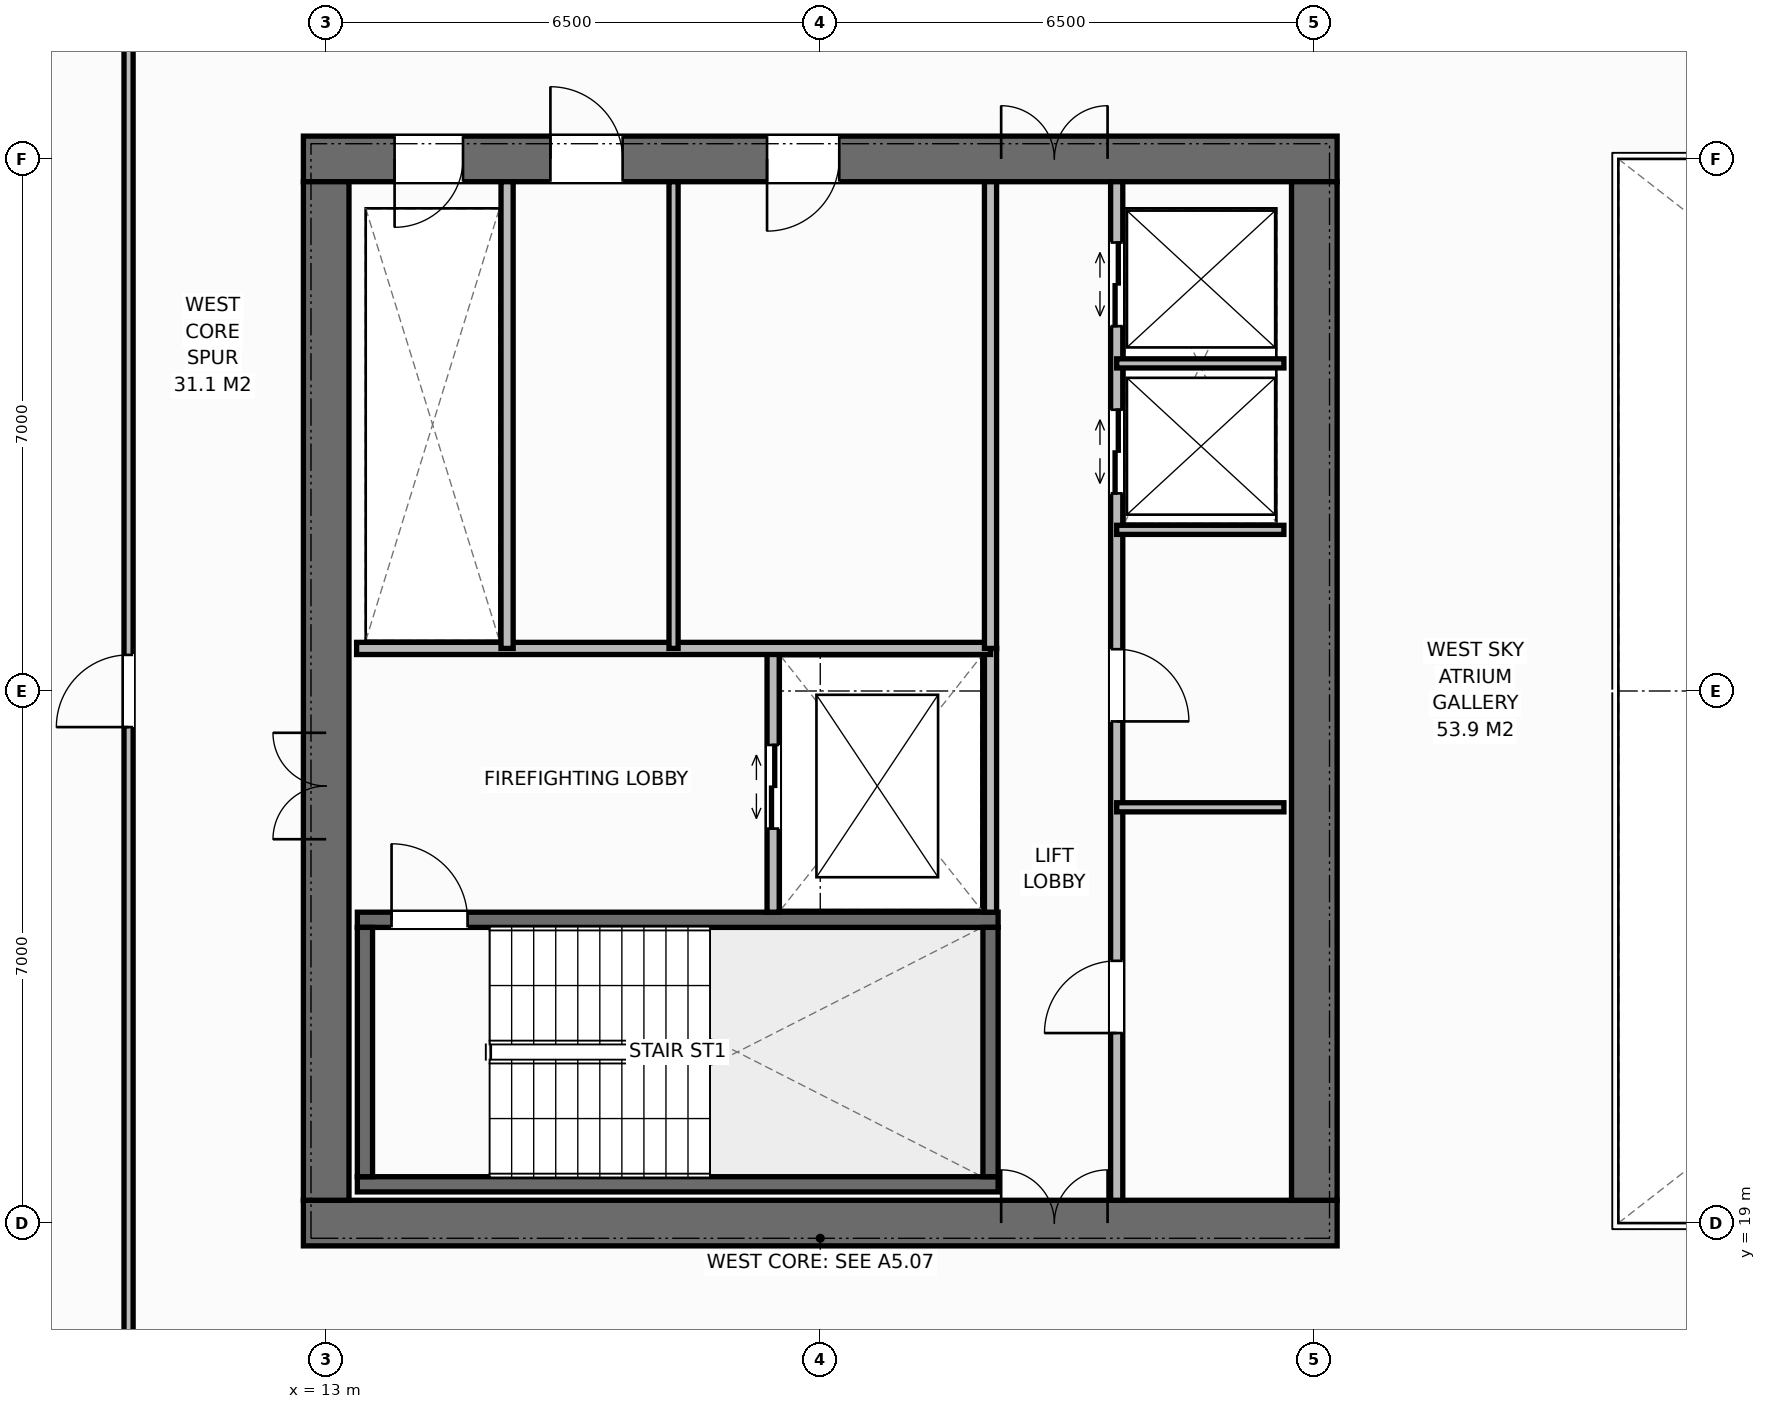
"""IFC4 building model, lengths in metres.
Left out: names, types, materials, properties, quantities, classifications, styles, units other than length and angle.
Written with IfcOpenShell. Run it as: python <this file> out.ifc"""

import sys

from ifc_helpers import new_model, si_unit, direction, frame, frame_2d, origin, place, context, subcontext, project, spatial, rectangle, extrude, element, fill, save


model = new_model("IFC4")
c1 = context("Model", 3, precision=1e-05, world=origin(), true_north=direction((0.0, 1.0)))
c2 = subcontext(c1, "Body", "Model", "MODEL_VIEW")
j1 = project(units=[si_unit("LENGTHUNIT", "METRE"), si_unit("PLANEANGLEUNIT", "RADIAN")], contexts=[c1])
p1 = place(None, origin())
s1 = spatial("IfcSite", under=j1, at=p1, CompositionType="ELEMENT")
p2 = place(p1, origin())
s2 = spatial("IfcBuilding", under=s1, at=p2, CompositionType="ELEMENT")
p3 = place(p2, frame((0.0, 0.0, 163.2)))
s3 = spatial("IfcBuildingStorey", under=s2, at=p3, CompositionType="ELEMENT", Elevation=163.2)
p4 = place(p3, frame((12.7, 19.0, 0.0), z_axis=(0.0, 0.0, 1.0), x_axis=(1.0, 0.0, 0.0)))
e1 = element("IfcWall", 1, at=p4, inside=s3, PredefinedType="SHEAR", context=c2, shape_type="SweptSolid", body=[
    extrude(rectangle(XDim=13.6, YDim=0.6, at=frame_2d((6.8, 0.0))), origin(), (0.0, 0.0, 1.0), 3.8),
])
p5 = place(p4, frame((9.18, 0.0, 0.0)))
e2 = element("IfcOpeningElement", 2, at=p5, cuts=e1, PredefinedType="OPENING", context=c2, shape_type="SweptSolid", body=[
    extrude(rectangle(XDim=1.4, YDim=2.2, at=frame_2d((0.7, 1.1))), frame((0.0, 0.31, 0.0), z_axis=(0.0, -1.0, 0.0), x_axis=(1.0, 0.0, 0.0)), (0.0, 0.0, 1.0), 0.62),
])
p6 = place(p3, frame((12.7, 33.0, 0.0), z_axis=(0.0, 0.0, 1.0), x_axis=(1.0, 0.0, 0.0)))
e3 = element("IfcWall", 3, at=p6, inside=s3, PredefinedType="SHEAR", context=c2, shape_type="SweptSolid", body=[
    extrude(rectangle(XDim=13.6, YDim=0.6, at=frame_2d((6.8, 0.0))), origin(), (0.0, 0.0, 1.0), 3.8),
])
p7 = place(p6, frame((1.2, 0.0, 0.0)))
e4 = element("IfcOpeningElement", 4, at=p7, cuts=e3, PredefinedType="OPENING", context=c2, shape_type="SweptSolid", body=[
    extrude(rectangle(XDim=0.9, YDim=2.15, at=frame_2d((0.45, 1.075))), frame((0.0, 0.31, 0.0), z_axis=(0.0, -1.0, 0.0), x_axis=(1.0, 0.0, 0.0)), (0.0, 0.0, 1.0), 0.62),
])
p8 = place(p6, frame((3.25, 0.0, 0.0)))
e5 = element("IfcOpeningElement", 5, at=p8, cuts=e3, PredefinedType="OPENING", context=c2, shape_type="SweptSolid", body=[
    extrude(rectangle(XDim=0.95, YDim=2.15, at=frame_2d((0.475, 1.075))), frame((0.0, 0.31, 0.0), z_axis=(0.0, -1.0, 0.0), x_axis=(1.0, 0.0, 0.0)), (0.0, 0.0, 1.0), 0.62),
])
p9 = place(p6, frame((6.1, 0.0, 0.0)))
e6 = element("IfcOpeningElement", 6, at=p9, cuts=e3, PredefinedType="OPENING", context=c2, shape_type="SweptSolid", body=[
    extrude(rectangle(XDim=0.95, YDim=2.15, at=frame_2d((0.475, 1.075))), frame((0.0, 0.31, 0.0), z_axis=(0.0, -1.0, 0.0), x_axis=(1.0, 0.0, 0.0)), (0.0, 0.0, 1.0), 0.62),
])
p10 = place(p6, frame((9.18, 0.0, 0.0)))
e7 = element("IfcOpeningElement", 7, at=p10, cuts=e3, PredefinedType="OPENING", context=c2, shape_type="SweptSolid", body=[
    extrude(rectangle(XDim=1.4, YDim=2.2, at=frame_2d((0.7, 1.1))), frame((0.0, 0.31, 0.0), z_axis=(0.0, -1.0, 0.0), x_axis=(1.0, 0.0, 0.0)), (0.0, 0.0, 1.0), 0.62),
])
p11 = place(p3, frame((13.0, 19.3, 0.0), z_axis=(0.0, 0.0, 1.0), x_axis=(0.0, 1.0, 0.0)))
e8 = element("IfcWall", 8, at=p11, inside=s3, PredefinedType="SHEAR", context=c2, shape_type="SweptSolid", body=[
    extrude(rectangle(XDim=13.4, YDim=0.6, at=frame_2d((6.7, 0.0))), origin(), (0.0, 0.0, 1.0), 3.8),
])
p12 = place(p11, frame((4.75, 0.0, 0.0)))
e9 = element("IfcOpeningElement", 9, at=p12, cuts=e8, PredefinedType="OPENING", context=c2, shape_type="SweptSolid", body=[
    extrude(rectangle(XDim=1.4, YDim=2.2, at=frame_2d((0.7, 1.1))), frame((0.0, 0.31, 0.0), z_axis=(0.0, -1.0, 0.0), x_axis=(1.0, 0.0, 0.0)), (0.0, 0.0, 1.0), 0.62),
])
p13 = place(p3, frame((26.0, 19.3, 0.0), z_axis=(0.0, 0.0, 1.0), x_axis=(0.0, 1.0, 0.0)))
e10 = element("IfcWall", 10, at=p13, inside=s3, PredefinedType="SHEAR", context=c2, shape_type="SweptSolid", body=[
    extrude(rectangle(XDim=13.4, YDim=0.6, at=frame_2d((6.7, 0.0))), origin(), (0.0, 0.0, 1.0), 3.8),
])
p14 = place(p3, frame((13.41, 19.51, 0.0), z_axis=(0.0, 0.0, 1.0), x_axis=(1.0, 0.0, 0.0)))
e11 = element("IfcWall", 11, at=p14, inside=s3, PredefinedType="SHEAR", context=c2, shape_type="SweptSolid", body=[
    extrude(rectangle(XDim=8.43, YDim=0.2, at=frame_2d((4.215, 0.0))), origin(), (0.0, 0.0, 1.0), 3.8),
])
p15 = place(p3, frame((13.41, 22.99, 0.0), z_axis=(0.0, 0.0, 1.0), x_axis=(1.0, 0.0, 0.0)))
e12 = element("IfcWall", 12, at=p15, inside=s3, PredefinedType="SHEAR", context=c2, shape_type="SweptSolid", body=[
    extrude(rectangle(XDim=8.43, YDim=0.2, at=frame_2d((4.215, 0.0))), origin(), (0.0, 0.0, 1.0), 3.8),
])
p16 = place(p15, frame((0.45, 0.0, 0.0)))
e13 = element("IfcOpeningElement", 13, at=p16, cuts=e12, PredefinedType="OPENING", context=c2, shape_type="SweptSolid", body=[
    extrude(rectangle(XDim=1.0, YDim=2.15, at=frame_2d((0.5, 1.075))), frame((0.0, 0.11, 0.0), z_axis=(0.0, -1.0, 0.0), x_axis=(1.0, 0.0, 0.0)), (0.0, 0.0, 1.0), 0.22),
])
for number, where, z_axis, x_axis in (
    (14, (13.51, 19.61, 0.0), (0.0, 0.0, 1.0), (0.0, 1.0, 0.0)),
    (15, (21.74, 19.61, 0.0), (0.0, 0.0, 1.0), (0.0, 1.0, 0.0)),
):
    element("IfcWall", number, at=place(p3, frame(where, z_axis=z_axis, x_axis=x_axis)), inside=s3, PredefinedType="SHEAR", context=c2, shape_type="SweptSolid", body=[
        extrude(rectangle(XDim=3.28, YDim=0.2, at=frame_2d((1.64, 0.0))), origin(), (0.0, 0.0, 1.0), 3.8),
    ])
p17 = place(p3, frame((21.74, 23.09, 0.0), z_axis=(0.0, 0.0, 1.0), x_axis=(0.0, 1.0, 0.0)))
e16 = element("IfcWall", 16, at=p17, inside=s3, PredefinedType="STANDARD", context=c2, shape_type="SweptSolid", body=[
    extrude(rectangle(XDim=3.47, YDim=0.16, at=frame_2d((1.735, 0.0))), origin(), (0.0, 0.0, 1.0), 3.572),
])
p18 = place(p3, frame((18.88, 23.09, 0.0), z_axis=(0.0, 0.0, 1.0), x_axis=(0.0, 1.0, 0.0)))
e17 = element("IfcWall", 17, at=p18, inside=s3, PredefinedType="STANDARD", context=c2, shape_type="SweptSolid", body=[
    extrude(rectangle(XDim=3.47, YDim=0.16, at=frame_2d((1.735, 0.0))), origin(), (0.0, 0.0, 1.0), 3.572),
])
p19 = place(p18, frame((1.1, 0.0, 0.0)))
e18 = element("IfcOpeningElement", 18, at=p19, cuts=e17, PredefinedType="OPENING", context=c2, shape_type="SweptSolid", body=[
    extrude(rectangle(XDim=1.1, YDim=2.2, at=frame_2d((0.55, 1.1))), frame((0.0, 0.09, 0.0), z_axis=(0.0, -1.0, 0.0), x_axis=(1.0, 0.0, 0.0)), (0.0, 0.0, 1.0), 0.18),
])
p20 = place(p3, frame((13.4, 26.56, 0.0), z_axis=(0.0, 0.0, 1.0), x_axis=(1.0, 0.0, 0.0)))
e19 = element("IfcWall", 19, at=p20, inside=s3, PredefinedType="STANDARD", context=c2, shape_type="SweptSolid", body=[
    extrude(rectangle(XDim=8.34, YDim=0.16, at=frame_2d((4.17, 0.0))), origin(), (0.0, 0.0, 1.0), 3.572),
])
p21 = place(p3, frame((15.38, 26.56, 0.0), z_axis=(0.0, 0.0, 1.0), x_axis=(0.0, 1.0, 0.0)))
e20 = element("IfcWall", 20, at=p21, inside=s3, PredefinedType="STANDARD", context=c2, shape_type="SweptSolid", body=[
    extrude(rectangle(XDim=6.14, YDim=0.16, at=frame_2d((3.07, 0.0))), origin(), (0.0, 0.0, 1.0), 3.572),
])
p22 = place(p3, frame((17.57, 26.56, 0.0), z_axis=(0.0, 0.0, 1.0), x_axis=(0.0, 1.0, 0.0)))
e21 = element("IfcWall", 21, at=p22, inside=s3, PredefinedType="PARTITIONING", context=c2, shape_type="SweptSolid", body=[
    extrude(rectangle(XDim=6.14, YDim=0.12, at=frame_2d((3.07, 0.0))), origin(), (0.0, 0.0, 1.0), 3.572),
])
p23 = place(p3, frame((21.74, 26.56, 0.0), z_axis=(0.0, 0.0, 1.0), x_axis=(0.0, 1.0, 0.0)))
e22 = element("IfcWall", 22, at=p23, inside=s3, PredefinedType="STANDARD", context=c2, shape_type="SweptSolid", body=[
    extrude(rectangle(XDim=6.14, YDim=0.16, at=frame_2d((3.07, 0.0))), origin(), (0.0, 0.0, 1.0), 3.572),
])
p24 = place(p3, frame((23.4, 19.3, 0.0), z_axis=(0.0, 0.0, 1.0), x_axis=(0.0, 1.0, 0.0)))
e23 = element("IfcWall", 23, at=p24, inside=s3, PredefinedType="STANDARD", context=c2, shape_type="SweptSolid", body=[
    extrude(rectangle(XDim=13.4, YDim=0.16, at=frame_2d((6.7, 0.0))), origin(), (0.0, 0.0, 1.0), 3.572),
])
p25 = place(p24, frame((2.2, 0.0, 0.0)))
e24 = element("IfcOpeningElement", 24, at=p25, cuts=e23, PredefinedType="OPENING", context=c2, shape_type="SweptSolid", body=[
    extrude(rectangle(XDim=0.95, YDim=2.15, at=frame_2d((0.475, 1.075))), frame((0.0, 0.09, 0.0), z_axis=(0.0, -1.0, 0.0), x_axis=(1.0, 0.0, 0.0)), (0.0, 0.0, 1.0), 0.18),
])
p26 = place(p24, frame((6.3, 0.0, 0.0)))
e25 = element("IfcOpeningElement", 25, at=p26, cuts=e23, PredefinedType="OPENING", context=c2, shape_type="SweptSolid", body=[
    extrude(rectangle(XDim=0.95, YDim=2.15, at=frame_2d((0.475, 1.075))), frame((0.0, 0.09, 0.0), z_axis=(0.0, -1.0, 0.0), x_axis=(1.0, 0.0, 0.0)), (0.0, 0.0, 1.0), 0.18),
])
p27 = place(p24, frame((9.3, 0.0, 0.0)))
e26 = element("IfcOpeningElement", 26, at=p27, cuts=e23, PredefinedType="OPENING", context=c2, shape_type="SweptSolid", body=[
    extrude(rectangle(XDim=1.1, YDim=2.2, at=frame_2d((0.55, 1.1))), frame((0.0, 0.09, 0.0), z_axis=(0.0, -1.0, 0.0), x_axis=(1.0, 0.0, 0.0)), (0.0, 0.0, 1.0), 0.18),
])
p28 = place(p24, frame((11.5, 0.0, 0.0)))
e27 = element("IfcOpeningElement", 27, at=p28, cuts=e23, PredefinedType="OPENING", context=c2, shape_type="SweptSolid", body=[
    extrude(rectangle(XDim=1.1, YDim=2.2, at=frame_2d((0.55, 1.1))), frame((0.0, 0.09, 0.0), z_axis=(0.0, -1.0, 0.0), x_axis=(1.0, 0.0, 0.0)), (0.0, 0.0, 1.0), 0.18),
])
for number, where, z_axis, x_axis in (
    (28, (23.4, 24.47, 0.0), (0.0, 0.0, 1.0), (1.0, 0.0, 0.0)),
    (29, (23.4, 28.12, 0.0), (0.0, 0.0, 1.0), (1.0, 0.0, 0.0)),
    (30, (23.4, 30.31, 0.0), (0.0, 0.0, 1.0), (1.0, 0.0, 0.0)),
):
    element("IfcWall", number, at=place(p3, frame(where, z_axis=z_axis, x_axis=x_axis)), inside=s3, PredefinedType="PARTITIONING", context=c2, shape_type="SweptSolid", body=[
        extrude(rectangle(XDim=2.2, YDim=0.12, at=frame_2d((1.1, 0.0))), origin(), (0.0, 0.0, 1.0), 3.572),
    ])
p29 = place(p3, frame((10.4, 16.5, 0.0), z_axis=(0.0, 0.0, 1.0), x_axis=(0.0, 1.0, 0.0)))
e31 = element("IfcWall", 31, at=p29, inside=s3, PredefinedType="PARTITIONING", context=c2, shape_type="SweptSolid", body=[
    extrude(rectangle(XDim=19.0, YDim=0.12, at=frame_2d((9.5, 0.0))), origin(), (0.0, 0.0, 1.0), 3.572),
])
p30 = place(p29, frame((9.025, 0.0, 0.0)))
e32 = element("IfcOpeningElement", 32, at=p30, cuts=e31, PredefinedType="OPENING", context=c2, shape_type="SweptSolid", body=[
    extrude(rectangle(XDim=0.95, YDim=2.15, at=frame_2d((0.475, 1.075))), frame((0.0, 0.07, 0.0), z_axis=(0.0, -1.0, 0.0), x_axis=(1.0, 0.0, 0.0)), (0.0, 0.0, 1.0), 0.14),
])
p31 = place(p16, origin())
e33 = element("IfcDoor", 33, at=p31, inside=s3, OperationType="SINGLE_SWING_LEFT", PredefinedType="DOOR", context=c2, shape_type="SweptSolid", body=[
    extrude(rectangle(XDim=1.0, YDim=2.15, at=frame_2d((0.5, 1.075))), frame((0.0, 0.025, 0.0), z_axis=(0.0, -1.0, 0.0), x_axis=(1.0, 0.0, 0.0)), (0.0, 0.0, 1.0), 0.05),
])
fill(e13, e33)
p32 = place(p12, origin())
e34 = element("IfcDoor", 34, at=p32, inside=s3, OperationType="DOUBLE_DOOR_SINGLE_SWING", PredefinedType="DOOR", context=c2, shape_type="SweptSolid", body=[
    extrude(rectangle(XDim=1.4, YDim=2.2, at=frame_2d((0.7, 1.1))), frame((0.0, 0.025, 0.0), z_axis=(0.0, -1.0, 0.0), x_axis=(1.0, 0.0, 0.0)), (0.0, 0.0, 1.0), 0.05),
])
fill(e9, e34)
p33 = place(p19, origin())
e35 = element("IfcDoor", 35, at=p33, inside=s3, OperationType="DOUBLE_DOOR_SLIDING", PredefinedType="DOOR", context=c2, shape_type="SweptSolid", body=[
    extrude(rectangle(XDim=1.1, YDim=2.2, at=frame_2d((0.55, 1.1))), frame((0.0, 0.025, 0.0), z_axis=(0.0, -1.0, 0.0), x_axis=(1.0, 0.0, 0.0)), (0.0, 0.0, 1.0), 0.05),
])
fill(e18, e35)
p34 = place(p7, origin())
e36 = element("IfcDoor", 36, at=p34, inside=s3, OperationType="SINGLE_SWING_RIGHT", PredefinedType="DOOR", context=c2, shape_type="SweptSolid", body=[
    extrude(rectangle(XDim=0.9, YDim=2.15, at=frame_2d((0.45, 1.075))), frame((0.0, -0.025, 0.0), z_axis=(0.0, -1.0, 0.0), x_axis=(1.0, 0.0, 0.0)), (0.0, 0.0, 1.0), 0.05),
])
fill(e4, e36)
p35 = place(p8, origin())
e37 = element("IfcDoor", 37, at=p35, inside=s3, OperationType="SINGLE_SWING_LEFT", PredefinedType="DOOR", context=c2, shape_type="SweptSolid", body=[
    extrude(rectangle(XDim=0.95, YDim=2.15, at=frame_2d((0.475, 1.075))), frame((0.0, -0.025, 0.0), z_axis=(0.0, -1.0, 0.0), x_axis=(1.0, 0.0, 0.0)), (0.0, 0.0, 1.0), 0.05),
])
fill(e5, e37)
p36 = place(p9, origin())
e38 = element("IfcDoor", 38, at=p36, inside=s3, OperationType="SINGLE_SWING_RIGHT", PredefinedType="DOOR", context=c2, shape_type="SweptSolid", body=[
    extrude(rectangle(XDim=0.95, YDim=2.15, at=frame_2d((0.475, 1.075))), frame((0.0, -0.025, 0.0), z_axis=(0.0, -1.0, 0.0), x_axis=(1.0, 0.0, 0.0)), (0.0, 0.0, 1.0), 0.05),
])
fill(e6, e38)
p37 = place(p5, origin())
e39 = element("IfcDoor", 39, at=p37, inside=s3, OperationType="DOUBLE_DOOR_SINGLE_SWING", PredefinedType="DOOR", context=c2, shape_type="SweptSolid", body=[
    extrude(rectangle(XDim=1.4, YDim=2.2, at=frame_2d((0.7, 1.1))), frame((0.0, 0.075, 0.0), z_axis=(0.0, -1.0, 0.0), x_axis=(1.0, 0.0, 0.0)), (0.0, 0.0, 1.0), 0.05),
])
fill(e2, e39)
p38 = place(p10, origin())
e40 = element("IfcDoor", 40, at=p38, inside=s3, OperationType="DOUBLE_DOOR_SINGLE_SWING", PredefinedType="DOOR", context=c2, shape_type="SweptSolid", body=[
    extrude(rectangle(XDim=1.4, YDim=2.2, at=frame_2d((0.7, 1.1))), frame((0.0, -0.025, 0.0), z_axis=(0.0, -1.0, 0.0), x_axis=(1.0, 0.0, 0.0)), (0.0, 0.0, 1.0), 0.05),
])
fill(e7, e40)
p39 = place(p25, origin())
e41 = element("IfcDoor", 41, at=p39, inside=s3, OperationType="SINGLE_SWING_LEFT", PredefinedType="DOOR", context=c2, shape_type="SweptSolid", body=[
    extrude(rectangle(XDim=0.95, YDim=2.15, at=frame_2d((0.475, 1.075))), frame((0.0, 0.025, 0.0), z_axis=(0.0, -1.0, 0.0), x_axis=(1.0, 0.0, 0.0)), (0.0, 0.0, 1.0), 0.05),
])
fill(e24, e41)
p40 = place(p26, origin())
e42 = element("IfcDoor", 42, at=p40, inside=s3, OperationType="SINGLE_SWING_RIGHT", PredefinedType="DOOR", context=c2, shape_type="SweptSolid", body=[
    extrude(rectangle(XDim=0.95, YDim=2.15, at=frame_2d((0.475, 1.075))), frame((0.0, 0.025, 0.0), z_axis=(0.0, -1.0, 0.0), x_axis=(1.0, 0.0, 0.0)), (0.0, 0.0, 1.0), 0.05),
])
fill(e25, e42)
p41 = place(p27, origin())
e43 = element("IfcDoor", 43, at=p41, inside=s3, OperationType="DOUBLE_DOOR_SLIDING", PredefinedType="DOOR", context=c2, shape_type="SweptSolid", body=[
    extrude(rectangle(XDim=1.1, YDim=2.2, at=frame_2d((0.55, 1.1))), frame((0.0, 0.025, 0.0), z_axis=(0.0, -1.0, 0.0), x_axis=(1.0, 0.0, 0.0)), (0.0, 0.0, 1.0), 0.05),
])
fill(e26, e43)
p42 = place(p28, origin())
e44 = element("IfcDoor", 44, at=p42, inside=s3, OperationType="DOUBLE_DOOR_SLIDING", PredefinedType="DOOR", context=c2, shape_type="SweptSolid", body=[
    extrude(rectangle(XDim=1.1, YDim=2.2, at=frame_2d((0.55, 1.1))), frame((0.0, 0.025, 0.0), z_axis=(0.0, -1.0, 0.0), x_axis=(1.0, 0.0, 0.0)), (0.0, 0.0, 1.0), 0.05),
])
fill(e27, e44)
p43 = place(p30, origin())
e45 = element("IfcDoor", 45, at=p43, inside=s3, OperationType="SINGLE_SWING_LEFT", PredefinedType="DOOR", context=c2, shape_type="SweptSolid", body=[
    extrude(rectangle(XDim=0.95, YDim=2.15, at=frame_2d((0.475, 1.075))), frame((0.0, 0.025, 0.0), z_axis=(0.0, -1.0, 0.0), x_axis=(1.0, 0.0, 0.0)), (0.0, 0.0, 1.0), 0.05),
])
fill(e32, e45)
save(model, sys.argv[1])
